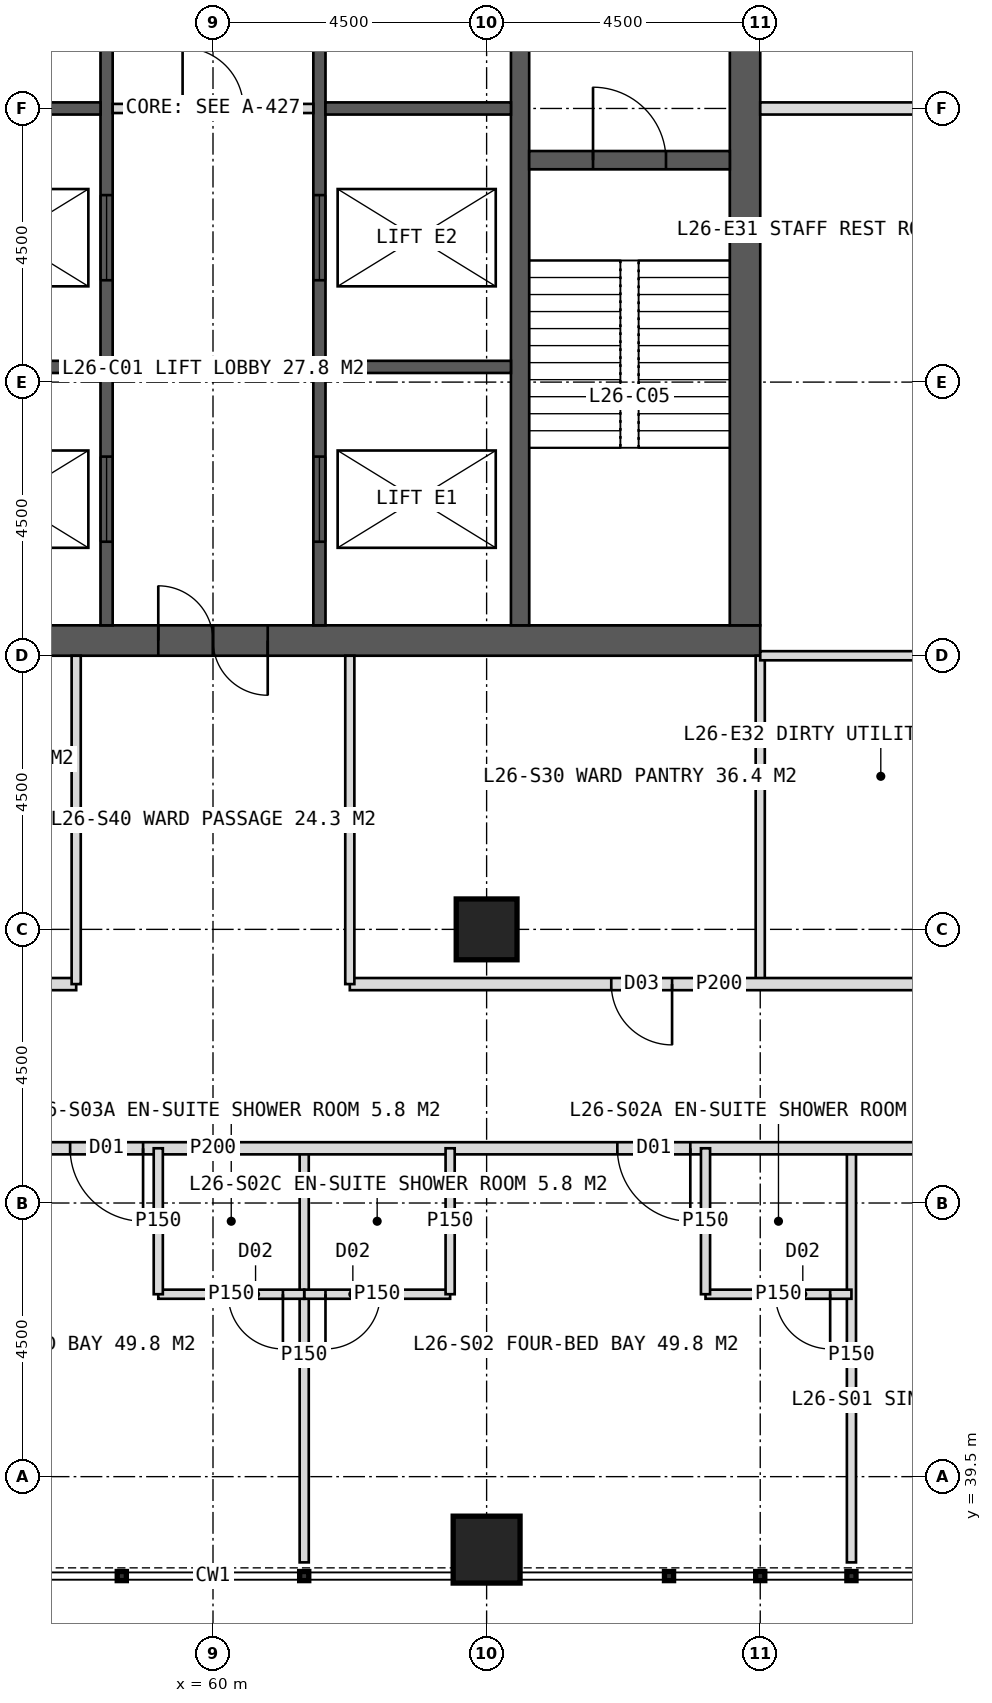
"""IFC4 building model, lengths in metres.
Left out: names, types, materials, properties, quantities, classifications, styles, units other than length and angle.
Written with IfcOpenShell. Run it as: python <this file> out.ifc"""

import sys

from ifc_helpers import new_model, si_unit, direction, frame, frame_2d, origin, origin_2d, place, context, subcontext, project, spatial, rectangle, hollow_rectangle, extrude, element, fill, save


model = new_model("IFC4")
c1 = context("Model", 3, precision=1e-05, world=origin(), true_north=direction((0.0, 1.0)))
c2 = subcontext(c1, "Body", "Model", "MODEL_VIEW")
j1 = project(units=[si_unit("LENGTHUNIT", "METRE"), si_unit("PLANEANGLEUNIT", "RADIAN")], contexts=[c1])
p1 = place(None, origin())
s1 = spatial("IfcSite", under=j1, at=p1, CompositionType="ELEMENT")
p2 = place(p1, origin())
s2 = spatial("IfcBuilding", under=s1, at=p2, CompositionType="ELEMENT")
p3 = place(p2, frame((0.0, 0.0, 112.0)))
s3 = spatial("IfcBuildingStorey", under=s2, at=p3, CompositionType="ELEMENT", Elevation=112.0)
p4 = place(p3, frame((51.0, 53.25, 0.0), z_axis=(0.0, 0.0, 1.0), x_axis=(1.0, 0.0, 0.0)))
e1 = element("IfcWall", 1, at=p4, inside=s3, PredefinedType="SHEAR", context=c2, shape_type="SweptSolid", body=[
    extrude(rectangle(XDim=18.0, YDim=0.5, at=frame_2d((9.0, 0.0))), origin(), (0.0, 0.0, 1.0), 4.0),
])
p5 = place(p4, frame((8.1, 0.0, 0.0)))
e2 = element("IfcOpeningElement", 2, at=p5, cuts=e1, PredefinedType="OPENING", context=c2, shape_type="SweptSolid", body=[
    extrude(rectangle(XDim=1.8, YDim=2.2, at=frame_2d((0.9, 1.1))), frame((0.0, 0.26, 0.0), z_axis=(0.0, -1.0, 0.0), x_axis=(1.0, 0.0, 0.0)), (0.0, 0.0, 1.0), 0.52),
])
p6 = place(p3, frame((68.75, 53.5, 0.0), z_axis=(0.0, 0.0, 1.0), x_axis=(0.0, 1.0, 0.0)))
e3 = element("IfcWall", 3, at=p6, inside=s3, PredefinedType="SHEAR", context=c2, shape_type="SweptSolid", body=[
    extrude(rectangle(XDim=17.0, YDim=0.5, at=frame_2d((8.5, 0.0))), origin(), (0.0, 0.0, 1.0), 4.0),
])
p7 = place(p6, frame((9.5, 0.0, 0.0)))
e4 = element("IfcOpeningElement", 4, at=p7, cuts=e3, PredefinedType="OPENING", context=c2, shape_type="SweptSolid", body=[
    extrude(rectangle(XDim=1.5, YDim=2.2, at=frame_2d((0.75, 1.1))), frame((0.0, 0.26, 0.0), z_axis=(0.0, -1.0, 0.0), x_axis=(1.0, 0.0, 0.0)), (0.0, 0.0, 1.0), 0.52),
])
p8 = place(p3, frame((65.05, 53.5, 0.0), z_axis=(0.0, 0.0, 1.0), x_axis=(0.0, 1.0, 0.0)))
e5 = element("IfcWall", 5, at=p8, inside=s3, PredefinedType="SHEAR", context=c2, shape_type="SweptSolid", body=[
    extrude(rectangle(XDim=17.0, YDim=0.3, at=frame_2d((8.5, 0.0))), origin(), (0.0, 0.0, 1.0), 4.0),
])
p9 = place(p3, frame((58.25, 53.5, 0.0), z_axis=(0.0, 0.0, 1.0), x_axis=(0.0, 1.0, 0.0)))
e6 = element("IfcWall", 6, at=p9, inside=s3, PredefinedType="SHEAR", context=c2, shape_type="SweptSolid", body=[
    extrude(rectangle(XDim=17.0, YDim=0.2, at=frame_2d((8.5, 0.0))), origin(), (0.0, 0.0, 1.0), 4.0),
])
p10 = place(p9, frame((1.375, 0.0, 0.0)))
e7 = element("IfcOpeningElement", 7, at=p10, cuts=e6, PredefinedType="OPENING", context=c2, shape_type="SweptSolid", body=[
    extrude(rectangle(XDim=1.4, YDim=2.2, at=frame_2d((0.7, 1.1))), frame((0.0, 0.11, 0.0), z_axis=(0.0, -1.0, 0.0), x_axis=(1.0, 0.0, 0.0)), (0.0, 0.0, 1.0), 0.22),
])
p11 = place(p9, frame((5.675, 0.0, 0.0)))
e8 = element("IfcOpeningElement", 8, at=p11, cuts=e6, PredefinedType="OPENING", context=c2, shape_type="SweptSolid", body=[
    extrude(rectangle(XDim=1.4, YDim=2.2, at=frame_2d((0.7, 1.1))), frame((0.0, 0.11, 0.0), z_axis=(0.0, -1.0, 0.0), x_axis=(1.0, 0.0, 0.0)), (0.0, 0.0, 1.0), 0.22),
])
p12 = place(p3, frame((61.75, 53.5, 0.0), z_axis=(0.0, 0.0, 1.0), x_axis=(0.0, 1.0, 0.0)))
e9 = element("IfcWall", 9, at=p12, inside=s3, PredefinedType="SHEAR", context=c2, shape_type="SweptSolid", body=[
    extrude(rectangle(XDim=17.0, YDim=0.2, at=frame_2d((8.5, 0.0))), origin(), (0.0, 0.0, 1.0), 4.0),
])
p13 = place(p12, frame((1.375, 0.0, 0.0)))
e10 = element("IfcOpeningElement", 10, at=p13, cuts=e9, PredefinedType="OPENING", context=c2, shape_type="SweptSolid", body=[
    extrude(rectangle(XDim=1.4, YDim=2.2, at=frame_2d((0.7, 1.1))), frame((0.0, 0.11, 0.0), z_axis=(0.0, -1.0, 0.0), x_axis=(1.0, 0.0, 0.0)), (0.0, 0.0, 1.0), 0.22),
])
p14 = place(p12, frame((5.675, 0.0, 0.0)))
e11 = element("IfcOpeningElement", 11, at=p14, cuts=e9, PredefinedType="OPENING", context=c2, shape_type="SweptSolid", body=[
    extrude(rectangle(XDim=1.4, YDim=2.2, at=frame_2d((0.7, 1.1))), frame((0.0, 0.11, 0.0), z_axis=(0.0, -1.0, 0.0), x_axis=(1.0, 0.0, 0.0)), (0.0, 0.0, 1.0), 0.22),
])
for number, where, z_axis, x_axis in (
    (12, (55.1, 57.75, 0.0), (0.0, 0.0, 1.0), (1.0, 0.0, 0.0)),
    (13, (61.85, 57.75, 0.0), (0.0, 0.0, 1.0), (1.0, 0.0, 0.0)),
    (14, (55.1, 62.0, 0.0), (0.0, 0.0, 1.0), (1.0, 0.0, 0.0)),
    (15, (61.85, 62.0, 0.0), (0.0, 0.0, 1.0), (1.0, 0.0, 0.0)),
):
    element("IfcWall", number, at=place(p3, frame(where, z_axis=z_axis, x_axis=x_axis)), inside=s3, PredefinedType="SHEAR", context=c2, shape_type="SweptSolid", body=[
        extrude(rectangle(XDim=3.05, YDim=0.2, at=frame_2d((1.525, 0.0))), origin(), (0.0, 0.0, 1.0), 4.0),
    ])
p15 = place(p3, frame((65.2, 61.15, 0.0), z_axis=(0.0, 0.0, 1.0), x_axis=(1.0, 0.0, 0.0)))
e16 = element("IfcWall", 16, at=p15, inside=s3, PredefinedType="SHEAR", context=c2, shape_type="SweptSolid", body=[
    extrude(rectangle(XDim=3.3, YDim=0.3, at=frame_2d((1.65, 0.0))), origin(), (0.0, 0.0, 1.0), 4.0),
])
p16 = place(p15, frame((1.05, 0.0, 0.0)))
e17 = element("IfcOpeningElement", 17, at=p16, cuts=e16, PredefinedType="OPENING", context=c2, shape_type="SweptSolid", body=[
    extrude(rectangle(XDim=1.2, YDim=2.1, at=frame_2d((0.6, 1.05))), frame((0.0, 0.16, 0.0), z_axis=(0.0, -1.0, 0.0), x_axis=(1.0, 0.0, 0.0)), (0.0, 0.0, 1.0), 0.32),
])
p17 = place(p3, frame((64.5, 48.5, 0.0), z_axis=(0.0, 0.0, 1.0), x_axis=(1.0, 0.0, 0.0)))
e18 = element("IfcColumn", 18, at=p17, inside=s3, PredefinedType="COLUMN", context=c2, shape_type="SweptSolid", body=[
    extrude(hollow_rectangle(XDim=1.0, YDim=1.0, WallThickness=0.1, at=origin_2d()), origin(), (0.0, 0.0, 1.0), 4.0),
])
p18 = place(p3, frame((64.5, 38.3, 0.0), z_axis=(0.0, 0.0, 1.0), x_axis=(1.0, 0.0, 0.0)))
e19 = element("IfcColumn", 19, at=p18, inside=s3, PredefinedType="COLUMN", context=c2, shape_type="SweptSolid", body=[
    extrude(hollow_rectangle(XDim=1.1, YDim=1.1, WallThickness=0.1, at=origin_2d()), origin(), (0.0, 0.0, 1.0), 4.0),
])
for number, where, z_axis, x_axis in (
    (20, (70.5, 44.9, 0.0), (0.0, 0.0, 1.0), (0.0, -1.0, 0.0)),
    (21, (61.5, 44.9, 0.0), (0.0, 0.0, 1.0), (0.0, -1.0, 0.0)),
):
    element("IfcWall", number, at=place(p3, frame(where, z_axis=z_axis, x_axis=x_axis)), inside=s3, PredefinedType="PARTITIONING", context=c2, shape_type="SweptSolid", body=[
        extrude(rectangle(XDim=6.81, YDim=0.15, at=frame_2d((3.405, 0.0))), origin(), (0.0, 0.0, 1.0), 3.75),
    ])
p19 = place(p3, frame((77.1, 44.9, 0.0), z_axis=(0.0, 0.0, 1.0), x_axis=(-1.0, 0.0, 0.0)))
e22 = element("IfcWall", 22, at=p19, inside=s3, PredefinedType="PARTITIONING", context=c2, shape_type="SweptSolid", body=[
    extrude(rectangle(XDim=34.2, YDim=0.2, at=frame_2d((17.1, 0.0))), origin(), (0.0, 0.0, 1.0), 3.75),
])
p20 = place(p19, frame((3.25, 0.0, 0.0)))
e23 = element("IfcOpeningElement", 23, at=p20, cuts=e22, PredefinedType="OPENING", context=c2, shape_type="SweptSolid", body=[
    extrude(rectangle(XDim=1.2, YDim=2.2, at=frame_2d((0.6, 1.1))), frame((0.0, 0.11, 0.0), z_axis=(0.0, -1.0, 0.0), x_axis=(1.0, 0.0, 0.0)), (0.0, 0.0, 1.0), 0.22),
])
p21 = place(p19, frame((9.25, 0.0, 0.0)))
e24 = element("IfcOpeningElement", 24, at=p21, cuts=e22, PredefinedType="OPENING", context=c2, shape_type="SweptSolid", body=[
    extrude(rectangle(XDim=1.2, YDim=2.2, at=frame_2d((0.6, 1.1))), frame((0.0, 0.11, 0.0), z_axis=(0.0, -1.0, 0.0), x_axis=(1.0, 0.0, 0.0)), (0.0, 0.0, 1.0), 0.22),
])
p22 = place(p19, frame((18.25, 0.0, 0.0)))
e25 = element("IfcOpeningElement", 25, at=p22, cuts=e22, PredefinedType="OPENING", context=c2, shape_type="SweptSolid", body=[
    extrude(rectangle(XDim=1.2, YDim=2.2, at=frame_2d((0.6, 1.1))), frame((0.0, 0.11, 0.0), z_axis=(0.0, -1.0, 0.0), x_axis=(1.0, 0.0, 0.0)), (0.0, 0.0, 1.0), 0.22),
])
p23 = place(p19, frame((27.25, 0.0, 0.0)))
e26 = element("IfcOpeningElement", 26, at=p23, cuts=e22, PredefinedType="OPENING", context=c2, shape_type="SweptSolid", body=[
    extrude(rectangle(XDim=1.2, YDim=2.2, at=frame_2d((0.6, 1.1))), frame((0.0, 0.11, 0.0), z_axis=(0.0, -1.0, 0.0), x_axis=(1.0, 0.0, 0.0)), (0.0, 0.0, 1.0), 0.22),
])
p24 = place(p3, frame((70.5, 42.5, 0.0), z_axis=(0.0, 0.0, 1.0), x_axis=(-1.0, 0.0, 0.0)))
e27 = element("IfcWall", 27, at=p24, inside=s3, PredefinedType="PARTITIONING", context=c2, shape_type="SweptSolid", body=[
    extrude(rectangle(XDim=2.4, YDim=0.15, at=frame_2d((1.2, 0.0))), origin(), (0.0, 0.0, 1.0), 3.75),
])
p25 = place(p24, frame((0.35, 0.0, 0.0)))
e28 = element("IfcOpeningElement", 28, at=p25, cuts=e27, PredefinedType="OPENING", context=c2, shape_type="SweptSolid", body=[
    extrude(rectangle(XDim=0.9, YDim=2.1, at=frame_2d((0.45, 1.05))), frame((0.0, 0.085, 0.0), z_axis=(0.0, -1.0, 0.0), x_axis=(1.0, 0.0, 0.0)), (0.0, 0.0, 1.0), 0.17),
])
p26 = place(p3, frame((68.1, 44.9, 0.0), z_axis=(0.0, 0.0, 1.0), x_axis=(0.0, -1.0, 0.0)))
e29 = element("IfcWall", 29, at=p26, inside=s3, PredefinedType="PARTITIONING", context=c2, shape_type="SweptSolid", body=[
    extrude(rectangle(XDim=2.4, YDim=0.15, at=frame_2d((1.2, 0.0))), origin(), (0.0, 0.0, 1.0), 3.75),
])
p27 = place(p3, frame((63.9, 42.5, 0.0), z_axis=(0.0, 0.0, 1.0), x_axis=(-1.0, 0.0, 0.0)))
e30 = element("IfcWall", 30, at=p27, inside=s3, PredefinedType="PARTITIONING", context=c2, shape_type="SweptSolid", body=[
    extrude(rectangle(XDim=2.4, YDim=0.15, at=frame_2d((1.2, 0.0))), origin(), (0.0, 0.0, 1.0), 3.75),
])
p28 = place(p27, frame((1.15, 0.0, 0.0)))
e31 = element("IfcOpeningElement", 31, at=p28, cuts=e30, PredefinedType="OPENING", context=c2, shape_type="SweptSolid", body=[
    extrude(rectangle(XDim=0.9, YDim=2.1, at=frame_2d((0.45, 1.05))), frame((0.0, 0.085, 0.0), z_axis=(0.0, -1.0, 0.0), x_axis=(1.0, 0.0, 0.0)), (0.0, 0.0, 1.0), 0.17),
])
p29 = place(p3, frame((63.9, 44.9, 0.0), z_axis=(0.0, 0.0, 1.0), x_axis=(0.0, -1.0, 0.0)))
e32 = element("IfcWall", 32, at=p29, inside=s3, PredefinedType="PARTITIONING", context=c2, shape_type="SweptSolid", body=[
    extrude(rectangle(XDim=2.4, YDim=0.15, at=frame_2d((1.2, 0.0))), origin(), (0.0, 0.0, 1.0), 3.75),
])
p30 = place(p3, frame((61.5, 42.5, 0.0), z_axis=(0.0, 0.0, 1.0), x_axis=(-1.0, 0.0, 0.0)))
e33 = element("IfcWall", 33, at=p30, inside=s3, PredefinedType="PARTITIONING", context=c2, shape_type="SweptSolid", body=[
    extrude(rectangle(XDim=2.4, YDim=0.15, at=frame_2d((1.2, 0.0))), origin(), (0.0, 0.0, 1.0), 3.75),
])
p31 = place(p30, frame((0.35, 0.0, 0.0)))
e34 = element("IfcOpeningElement", 34, at=p31, cuts=e33, PredefinedType="OPENING", context=c2, shape_type="SweptSolid", body=[
    extrude(rectangle(XDim=0.9, YDim=2.1, at=frame_2d((0.45, 1.05))), frame((0.0, 0.085, 0.0), z_axis=(0.0, -1.0, 0.0), x_axis=(1.0, 0.0, 0.0)), (0.0, 0.0, 1.0), 0.17),
])
p32 = place(p3, frame((59.1, 44.9, 0.0), z_axis=(0.0, 0.0, 1.0), x_axis=(0.0, -1.0, 0.0)))
e35 = element("IfcWall", 35, at=p32, inside=s3, PredefinedType="PARTITIONING", context=c2, shape_type="SweptSolid", body=[
    extrude(rectangle(XDim=2.4, YDim=0.15, at=frame_2d((1.2, 0.0))), origin(), (0.0, 0.0, 1.0), 3.75),
])
p33 = place(p3, frame((69.0, 53.0, 0.0), z_axis=(0.0, 0.0, 1.0), x_axis=(0.0, -1.0, 0.0)))
e36 = element("IfcWall", 36, at=p33, inside=s3, PredefinedType="PARTITIONING", context=c2, shape_type="SweptSolid", body=[
    extrude(rectangle(XDim=5.4, YDim=0.15, at=frame_2d((2.7, 0.0))), origin(), (0.0, 0.0, 1.0), 3.75),
])
p34 = place(p3, frame((74.4, 47.6, 0.0), z_axis=(0.0, 0.0, 1.0), x_axis=(-1.0, 0.0, 0.0)))
e37 = element("IfcWall", 37, at=p34, inside=s3, PredefinedType="PARTITIONING", context=c2, shape_type="SweptSolid", body=[
    extrude(rectangle(XDim=12.15, YDim=0.2, at=frame_2d((6.075, 0.0))), origin(), (0.0, 0.0, 1.0), 3.75),
])
p35 = place(p34, frame((6.85, 0.0, 0.0)))
e38 = element("IfcOpeningElement", 38, at=p35, cuts=e37, PredefinedType="OPENING", context=c2, shape_type="SweptSolid", body=[
    extrude(rectangle(XDim=1.0, YDim=2.1, at=frame_2d((0.5, 1.05))), frame((0.0, 0.11, 0.0), z_axis=(0.0, -1.0, 0.0), x_axis=(1.0, 0.0, 0.0)), (0.0, 0.0, 1.0), 0.22),
])
p36 = place(p3, frame((57.75, 47.6, 0.0), z_axis=(0.0, 0.0, 1.0), x_axis=(-1.0, 0.0, 0.0)))
e39 = element("IfcWall", 39, at=p36, inside=s3, PredefinedType="PARTITIONING", context=c2, shape_type="SweptSolid", body=[
    extrude(rectangle(XDim=12.15, YDim=0.2, at=frame_2d((6.075, 0.0))), origin(), (0.0, 0.0, 1.0), 3.75),
])
p37 = place(p36, frame((3.55, 0.0, 0.0)))
e40 = element("IfcOpeningElement", 40, at=p37, cuts=e39, PredefinedType="OPENING", context=c2, shape_type="SweptSolid", body=[
    extrude(rectangle(XDim=1.0, YDim=2.1, at=frame_2d((0.5, 1.05))), frame((0.0, 0.11, 0.0), z_axis=(0.0, -1.0, 0.0), x_axis=(1.0, 0.0, 0.0)), (0.0, 0.0, 1.0), 0.22),
])
p38 = place(p36, frame((8.2, 0.0, 0.0)))
e41 = element("IfcOpeningElement", 41, at=p38, cuts=e39, PredefinedType="OPENING", context=c2, shape_type="SweptSolid", body=[
    extrude(rectangle(XDim=1.0, YDim=2.1, at=frame_2d((0.5, 1.05))), frame((0.0, 0.11, 0.0), z_axis=(0.0, -1.0, 0.0), x_axis=(1.0, 0.0, 0.0)), (0.0, 0.0, 1.0), 0.22),
])
for number, where, z_axis, x_axis in (
    (42, (62.25, 53.0, 0.0), (0.0, 0.0, 1.0), (0.0, -1.0, 0.0)),
    (43, (57.75, 53.0, 0.0), (0.0, 0.0, 1.0), (0.0, -1.0, 0.0)),
):
    element("IfcWall", number, at=place(p3, frame(where, z_axis=z_axis, x_axis=x_axis)), inside=s3, PredefinedType="PARTITIONING", context=c2, shape_type="SweptSolid", body=[
        extrude(rectangle(XDim=5.4, YDim=0.15, at=frame_2d((2.7, 0.0))), origin(), (0.0, 0.0, 1.0), 3.75),
    ])
p39 = place(p3, frame((69.0, 62.0, 0.0), z_axis=(0.0, 0.0, 1.0), x_axis=(1.0, 0.0, 0.0)))
e44 = element("IfcWall", 44, at=p39, inside=s3, PredefinedType="SOLIDWALL", context=c2, shape_type="SweptSolid", body=[
    extrude(rectangle(XDim=5.4, YDim=0.2, at=frame_2d((2.7, 0.0))), origin(), (0.0, 0.0, 1.0), 2.95),
])
p40 = place(p3, frame((69.0, 53.0, 0.0), z_axis=(0.0, 0.0, 1.0), x_axis=(1.0, 0.0, 0.0)))
e45 = element("IfcWall", 45, at=p40, inside=s3, PredefinedType="PARTITIONING", context=c2, shape_type="SweptSolid", body=[
    extrude(rectangle(XDim=5.4, YDim=0.15, at=frame_2d((2.7, 0.0))), origin(), (0.0, 0.0, 1.0), 3.75),
])
p41 = place(p3, frame((58.35, 62.0, 0.0), z_axis=(0.0, 0.0, 1.0), x_axis=(1.0, 0.0, 0.0)))
e46 = element("IfcWall", 46, at=p41, inside=s3, PredefinedType="PARTITIONING", context=c2, shape_type="SweptSolid", body=[
    extrude(rectangle(XDim=3.3, YDim=0.15, at=frame_2d((1.65, 0.0))), origin(), (0.0, 0.0, 1.0), 3.75),
])
p42 = place(p41, frame((1.15, 0.0, 0.0)))
e47 = element("IfcOpeningElement", 47, at=p42, cuts=e46, PredefinedType="OPENING", context=c2, shape_type="SweptSolid", body=[
    extrude(rectangle(XDim=1.0, YDim=2.1, at=frame_2d((0.5, 1.05))), frame((0.0, 0.085, 0.0), z_axis=(0.0, -1.0, 0.0), x_axis=(1.0, 0.0, 0.0)), (0.0, 0.0, 1.0), 0.17),
])
p43 = place(p21, origin())
e48 = element("IfcDoor", 48, at=p43, inside=s3, OperationType="SINGLE_SWING_LEFT", PredefinedType="DOOR", context=c2, shape_type="SweptSolid", body=[
    extrude(rectangle(XDim=1.2, YDim=2.2, at=frame_2d((0.6, 1.1))), frame((0.0, 0.025, 0.0), z_axis=(0.0, -1.0, 0.0), x_axis=(1.0, 0.0, 0.0)), (0.0, 0.0, 1.0), 0.05),
])
fill(e24, e48)
p44 = place(p25, origin())
e49 = element("IfcDoor", 49, at=p44, inside=s3, OperationType="SINGLE_SWING_LEFT", PredefinedType="DOOR", context=c2, shape_type="SweptSolid", body=[
    extrude(rectangle(XDim=0.9, YDim=2.1, at=frame_2d((0.45, 1.05))), frame((0.0, 0.025, 0.0), z_axis=(0.0, -1.0, 0.0), x_axis=(1.0, 0.0, 0.0)), (0.0, 0.0, 1.0), 0.05),
])
fill(e28, e49)
p45 = place(p28, origin())
e50 = element("IfcDoor", 50, at=p45, inside=s3, OperationType="SINGLE_SWING_RIGHT", PredefinedType="DOOR", context=c2, shape_type="SweptSolid", body=[
    extrude(rectangle(XDim=0.9, YDim=2.1, at=frame_2d((0.45, 1.05))), frame((0.0, 0.025, 0.0), z_axis=(0.0, -1.0, 0.0), x_axis=(1.0, 0.0, 0.0)), (0.0, 0.0, 1.0), 0.05),
])
fill(e31, e50)
p46 = place(p22, origin())
e51 = element("IfcDoor", 51, at=p46, inside=s3, OperationType="SINGLE_SWING_LEFT", PredefinedType="DOOR", context=c2, shape_type="SweptSolid", body=[
    extrude(rectangle(XDim=1.2, YDim=2.2, at=frame_2d((0.6, 1.1))), frame((0.0, 0.025, 0.0), z_axis=(0.0, -1.0, 0.0), x_axis=(1.0, 0.0, 0.0)), (0.0, 0.0, 1.0), 0.05),
])
fill(e25, e51)
p47 = place(p31, origin())
e52 = element("IfcDoor", 52, at=p47, inside=s3, OperationType="SINGLE_SWING_LEFT", PredefinedType="DOOR", context=c2, shape_type="SweptSolid", body=[
    extrude(rectangle(XDim=0.9, YDim=2.1, at=frame_2d((0.45, 1.05))), frame((0.0, 0.025, 0.0), z_axis=(0.0, -1.0, 0.0), x_axis=(1.0, 0.0, 0.0)), (0.0, 0.0, 1.0), 0.05),
])
fill(e34, e52)
p48 = place(p35, origin())
e53 = element("IfcDoor", 53, at=p48, inside=s3, OperationType="SINGLE_SWING_LEFT", PredefinedType="DOOR", context=c2, shape_type="SweptSolid", body=[
    extrude(rectangle(XDim=1.0, YDim=2.1, at=frame_2d((0.5, 1.05))), frame((0.0, 0.025, 0.0), z_axis=(0.0, -1.0, 0.0), x_axis=(1.0, 0.0, 0.0)), (0.0, 0.0, 1.0), 0.05),
])
fill(e38, e53)
p49 = place(p5, origin())
e54 = element("IfcDoor", 54, at=p49, inside=s3, OperationType="DOUBLE_DOOR_SINGLE_SWING", PredefinedType="DOOR", context=c2, shape_type="SweptSolid", body=[
    extrude(rectangle(XDim=1.8, YDim=2.2, at=frame_2d((0.9, 1.1))), frame((0.0, 0.025, 0.0), z_axis=(0.0, -1.0, 0.0), x_axis=(1.0, 0.0, 0.0)), (0.0, 0.0, 1.0), 0.05),
])
fill(e2, e54)
p50 = place(p16, origin())
e55 = element("IfcDoor", 55, at=p50, inside=s3, OperationType="SINGLE_SWING_LEFT", PredefinedType="DOOR", context=c2, shape_type="SweptSolid", body=[
    extrude(rectangle(XDim=1.2, YDim=2.1, at=frame_2d((0.6, 1.05))), frame((0.0, 0.025, 0.0), z_axis=(0.0, -1.0, 0.0), x_axis=(1.0, 0.0, 0.0)), (0.0, 0.0, 1.0), 0.05),
])
fill(e17, e55)
p51 = place(p10, origin())
e56 = element("IfcDoor", 56, at=p51, inside=s3, OperationType="SLIDING_TO_LEFT", PredefinedType="DOOR", context=c2, shape_type="SweptSolid", body=[
    extrude(rectangle(XDim=1.4, YDim=2.2, at=frame_2d((0.7, 1.1))), frame((0.0, 0.025, 0.0), z_axis=(0.0, -1.0, 0.0), x_axis=(1.0, 0.0, 0.0)), (0.0, 0.0, 1.0), 0.05),
])
fill(e7, e56)
p52 = place(p13, origin())
e57 = element("IfcDoor", 57, at=p52, inside=s3, OperationType="SLIDING_TO_LEFT", PredefinedType="DOOR", context=c2, shape_type="SweptSolid", body=[
    extrude(rectangle(XDim=1.4, YDim=2.2, at=frame_2d((0.7, 1.1))), frame((0.0, 0.025, 0.0), z_axis=(0.0, -1.0, 0.0), x_axis=(1.0, 0.0, 0.0)), (0.0, 0.0, 1.0), 0.05),
])
fill(e10, e57)
p53 = place(p11, origin())
e58 = element("IfcDoor", 58, at=p53, inside=s3, OperationType="SLIDING_TO_LEFT", PredefinedType="DOOR", context=c2, shape_type="SweptSolid", body=[
    extrude(rectangle(XDim=1.4, YDim=2.2, at=frame_2d((0.7, 1.1))), frame((0.0, 0.025, 0.0), z_axis=(0.0, -1.0, 0.0), x_axis=(1.0, 0.0, 0.0)), (0.0, 0.0, 1.0), 0.05),
])
fill(e8, e58)
p54 = place(p14, origin())
e59 = element("IfcDoor", 59, at=p54, inside=s3, OperationType="SLIDING_TO_LEFT", PredefinedType="DOOR", context=c2, shape_type="SweptSolid", body=[
    extrude(rectangle(XDim=1.4, YDim=2.2, at=frame_2d((0.7, 1.1))), frame((0.0, 0.025, 0.0), z_axis=(0.0, -1.0, 0.0), x_axis=(1.0, 0.0, 0.0)), (0.0, 0.0, 1.0), 0.05),
])
fill(e11, e59)
p55 = place(p42, origin())
e60 = element("IfcDoor", 60, at=p55, inside=s3, OperationType="SINGLE_SWING_LEFT", PredefinedType="DOOR", context=c2, shape_type="SweptSolid", body=[
    extrude(rectangle(XDim=1.0, YDim=2.1, at=frame_2d((0.5, 1.05))), frame((0.0, 0.025, 0.0), z_axis=(0.0, -1.0, 0.0), x_axis=(1.0, 0.0, 0.0)), (0.0, 0.0, 1.0), 0.05),
])
fill(e47, e60)
save(model, sys.argv[1])
